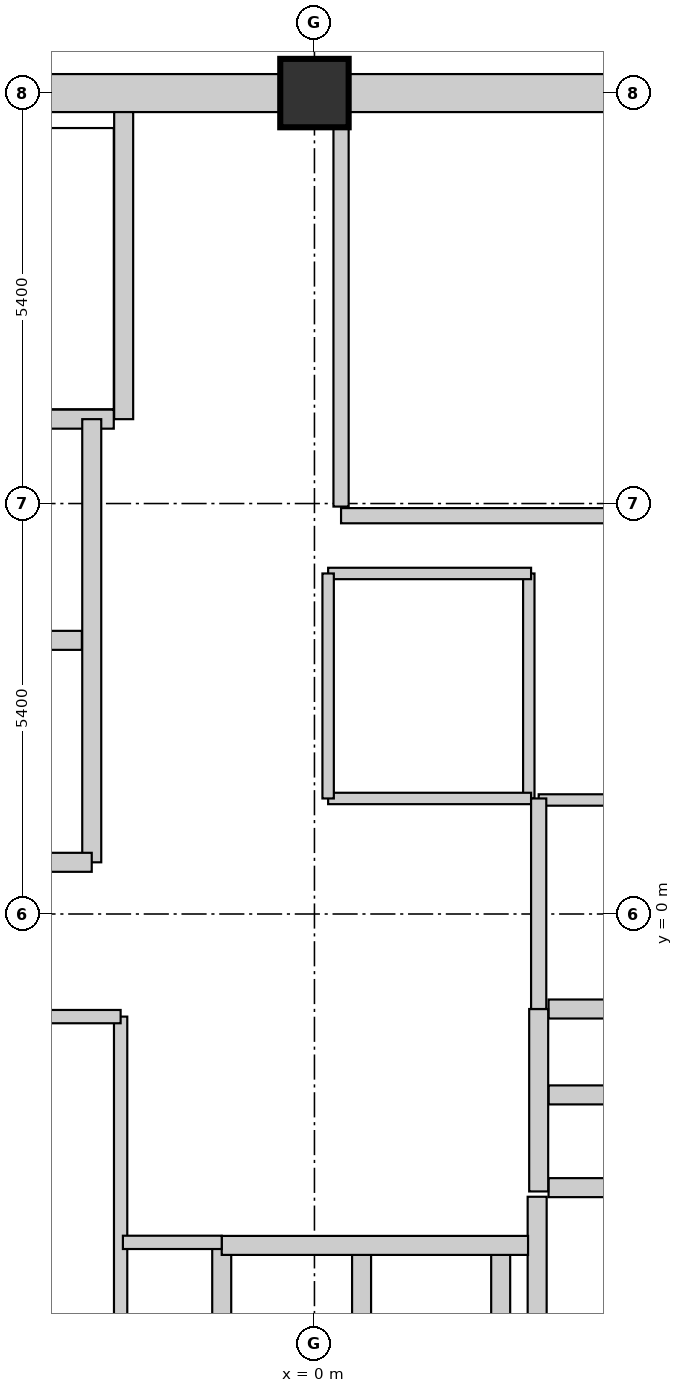
"""IFC4 building model, lengths in metres.
Left out: names, types, materials, properties, quantities, classifications, styles, units other than length and angle.
Written with IfcOpenShell. Run it as: python <this file> out.ifc"""

import sys

from ifc_helpers import new_model, si_unit, direction, frame, frame_2d, origin, origin_2d, place, context, subcontext, project, spatial, rectangle, extrude, element, fill, save


model = new_model("IFC4")
c1 = context("Model", 3, precision=1e-05, world=origin(), true_north=direction((0.0, 1.0)))
c2 = subcontext(c1, "Body", "Model", "MODEL_VIEW")
j1 = project(units=[si_unit("LENGTHUNIT", "METRE"), si_unit("PLANEANGLEUNIT", "RADIAN")], contexts=[c1])
p1 = place(None, origin())
s1 = spatial("IfcSite", under=j1, at=p1, CompositionType="ELEMENT")
p2 = place(p1, origin())
s2 = spatial("IfcBuilding", under=s1, at=p2, CompositionType="ELEMENT")
p3 = place(p2, frame((0.0, 0.0, 337.5)))
s3 = spatial("IfcBuildingStorey", under=s2, at=p3, CompositionType="ELEMENT", Elevation=337.5)
p4 = place(p3, frame((0.0, 10.8, 0.0), z_axis=(0.0, 0.0, 1.0), x_axis=(1.0, 0.0, 0.0)))
e1 = element("IfcColumn", 1, at=p4, inside=s3, PredefinedType="COLUMN", context=c2, shape_type="SweptSolid", body=[
    extrude(rectangle(XDim=0.9, YDim=0.9, at=origin_2d()), origin(), (0.0, 0.0, 1.0), 4.5),
])
p5 = place(p3, frame((-4.94, 10.8, 0.0), z_axis=(0.0, 0.0, 1.0), x_axis=(1.0, 0.0, 0.0)))
e2 = element("IfcWall", 2, at=p5, inside=s3, PredefinedType="SHEAR", context=c2, shape_type="SweptSolid", body=[
    extrude(rectangle(XDim=4.48, YDim=0.5, at=frame_2d((2.24, 0.0))), origin(), (0.0, 0.0, 1.0), 4.5),
])
p6 = place(p5, frame((3.13, 0.0, 0.0)))
e3 = element("IfcOpeningElement", 3, at=p6, cuts=e2, PredefinedType="OPENING", context=c2, shape_type="SweptSolid", body=[
    extrude(rectangle(XDim=1.1, YDim=2.1, at=frame_2d((0.55, 1.05))), frame((0.0, 0.26, 0.0), z_axis=(0.0, -1.0, 0.0), x_axis=(1.0, 0.0, 0.0)), (0.0, 0.0, 1.0), 0.52),
])
p7 = place(p3, frame((0.46, 10.8, 0.0), z_axis=(0.0, 0.0, 1.0), x_axis=(1.0, 0.0, 0.0)))
e4 = element("IfcWall", 4, at=p7, inside=s3, PredefinedType="SHEAR", context=c2, shape_type="SweptSolid", body=[
    extrude(rectangle(XDim=4.48, YDim=0.5, at=frame_2d((2.24, 0.0))), origin(), (0.0, 0.0, 1.0), 4.5),
])
p8 = place(p3, frame((2.93, -6.51, 0.0), z_axis=(0.0, 0.0, 1.0), x_axis=(0.0, 1.0, 0.0)))
e5 = element("IfcWall", 5, at=p8, inside=s3, PredefinedType="SHEAR", context=c2, shape_type="SweptSolid", body=[
    extrude(rectangle(XDim=2.79, YDim=0.25, at=frame_2d((1.395, 0.0))), origin(), (0.0, 0.0, 1.0), 4.5),
])
p9 = place(p3, frame((3.08, -3.6, 0.0), z_axis=(0.0, 0.0, 1.0), x_axis=(1.0, 0.0, 0.0)))
e6 = element("IfcWall", 6, at=p9, inside=s3, PredefinedType="SHEAR", context=c2, shape_type="SweptSolid", body=[
    extrude(rectangle(XDim=2.37, YDim=0.25, at=frame_2d((1.185, 0.0))), origin(), (0.0, 0.0, 1.0), 4.5),
])
for number, where, z_axis, x_axis in (
    (7, (0.62, -6.34, 0.0), (0.0, 0.0, 1.0), (0.0, 1.0, 0.0)),
    (8, (2.45, -6.34, 0.0), (0.0, 0.0, 1.0), (0.0, 1.0, 0.0)),
):
    element("IfcWall", number, at=place(p3, frame(where, z_axis=z_axis, x_axis=x_axis)), inside=s3, PredefinedType="SHEAR", context=c2, shape_type="SweptSolid", body=[
        extrude(rectangle(XDim=1.88, YDim=0.25, at=frame_2d((0.94, 0.0))), origin(), (0.0, 0.0, 1.0), 4.5),
    ])
p10 = place(p3, frame((-1.22, -6.44, 0.0), z_axis=(0.0, 0.0, 1.0), x_axis=(0.0, 1.0, 0.0)))
e9 = element("IfcWall", 9, at=p10, inside=s3, PredefinedType="SHEAR", context=c2, shape_type="SweptSolid", body=[
    extrude(rectangle(XDim=2.08, YDim=0.25, at=frame_2d((1.04, 0.0))), origin(), (0.0, 0.0, 1.0), 4.5),
])
p11 = place(p3, frame((-1.22, -4.36, 0.0), z_axis=(0.0, 0.0, 1.0), x_axis=(1.0, 0.0, 0.0)))
e10 = element("IfcWall", 10, at=p11, inside=s3, PredefinedType="SHEAR", context=c2, shape_type="SweptSolid", body=[
    extrude(rectangle(XDim=4.03, YDim=0.25, at=frame_2d((2.015, 0.0))), origin(), (0.0, 0.0, 1.0), 4.5),
])
for number, where, z_axis, x_axis in (
    (11, (3.08, -2.38, 0.0), (0.0, 0.0, 1.0), (1.0, 0.0, 0.0)),
    (12, (3.08, -1.25, 0.0), (0.0, 0.0, 1.0), (1.0, 0.0, 0.0)),
):
    element("IfcWall", number, at=place(p3, frame(where, z_axis=z_axis, x_axis=x_axis)), inside=s3, PredefinedType="SHEAR", context=c2, shape_type="SweptSolid", body=[
        extrude(rectangle(XDim=2.37, YDim=0.25, at=frame_2d((1.185, 0.0))), origin(), (0.0, 0.0, 1.0), 4.5),
    ])
p12 = place(p3, frame((2.95, -3.65, 0.0), z_axis=(0.0, 0.0, 1.0), x_axis=(0.0, 1.0, 0.0)))
e13 = element("IfcWall", 13, at=p12, inside=s3, PredefinedType="SHEAR", context=c2, shape_type="SweptSolid", body=[
    extrude(rectangle(XDim=2.4, YDim=0.25, at=frame_2d((1.2, 0.0))), origin(), (0.0, 0.0, 1.0), 4.5),
])
p13 = place(p12, frame((0.775, 0.0, 0.0)))
e14 = element("IfcOpeningElement", 14, at=p13, cuts=e13, PredefinedType="OPENING", context=c2, shape_type="SweptSolid", body=[
    extrude(rectangle(XDim=0.85, YDim=2.1, at=frame_2d((0.425, 1.05))), frame((0.0, 0.135, 0.0), z_axis=(0.0, -1.0, 0.0), x_axis=(1.0, 0.0, 0.0)), (0.0, 0.0, 1.0), 0.27),
])
p14 = place(p3, frame((-2.51, 6.51, 0.0), z_axis=(0.0, 0.0, 1.0), x_axis=(0.0, 1.0, 0.0)))
e15 = element("IfcWall", 15, at=p14, inside=s3, PredefinedType="SHEAR", context=c2, shape_type="SweptSolid", body=[
    extrude(rectangle(XDim=4.04, YDim=0.25, at=frame_2d((2.02, 0.0))), origin(), (0.0, 0.0, 1.0), 4.5),
])
p15 = place(p3, frame((-10.34, 6.51, 0.0), z_axis=(0.0, 0.0, 1.0), x_axis=(1.0, 0.0, 0.0)))
e16 = element("IfcWall", 16, at=p15, inside=s3, PredefinedType="SHEAR", context=c2, shape_type="SweptSolid", body=[
    extrude(rectangle(XDim=7.7, YDim=0.25, at=frame_2d((3.85, 0.0))), origin(), (0.0, 0.0, 1.0), 4.5),
])
p16 = place(p15, frame((0.35, 0.0, 0.0)))
e17 = element("IfcOpeningElement", 17, at=p16, cuts=e16, PredefinedType="OPENING", context=c2, shape_type="SweptSolid", body=[
    extrude(rectangle(XDim=1.1, YDim=2.1, at=frame_2d((0.55, 1.05))), frame((0.0, 0.135, 0.0), z_axis=(0.0, -1.0, 0.0), x_axis=(1.0, 0.0, 0.0)), (0.0, 0.0, 1.0), 0.27),
])
p17 = place(p3, frame((-2.93, 0.68, 0.0), z_axis=(0.0, 0.0, 1.0), x_axis=(0.0, 1.0, 0.0)))
e18 = element("IfcWall", 18, at=p17, inside=s3, PredefinedType="SHEAR", context=c2, shape_type="SweptSolid", body=[
    extrude(rectangle(XDim=5.83, YDim=0.25, at=frame_2d((2.915, 0.0))), origin(), (0.0, 0.0, 1.0), 4.5),
])
p18 = place(p17, frame((0.75, 0.0, 0.0)))
e19 = element("IfcOpeningElement", 19, at=p18, cuts=e18, PredefinedType="OPENING", context=c2, shape_type="SweptSolid", body=[
    extrude(rectangle(XDim=1.2, YDim=2.1, at=frame_2d((0.6, 1.05))), frame((0.0, 0.135, 0.0), z_axis=(0.0, -1.0, 0.0), x_axis=(1.0, 0.0, 0.0)), (0.0, 0.0, 1.0), 0.27),
])
p19 = place(p3, frame((-5.45, 3.6, 0.0), z_axis=(0.0, 0.0, 1.0), x_axis=(1.0, 0.0, 0.0)))
e20 = element("IfcWall", 20, at=p19, inside=s3, PredefinedType="SHEAR", context=c2, shape_type="SweptSolid", body=[
    extrude(rectangle(XDim=2.39, YDim=0.25, at=frame_2d((1.195, 0.0))), origin(), (0.0, 0.0, 1.0), 4.5),
])
p20 = place(p3, frame((-5.58, 0.68, 0.0), z_axis=(0.0, 0.0, 1.0), x_axis=(1.0, 0.0, 0.0)))
e21 = element("IfcWall", 21, at=p20, inside=s3, PredefinedType="SHEAR", context=c2, shape_type="SweptSolid", body=[
    extrude(rectangle(XDim=2.65, YDim=0.25, at=frame_2d((1.325, 0.0))), origin(), (0.0, 0.0, 1.0), 4.5),
])
p21 = place(p3, frame((2.82, 1.52, 0.0), z_axis=(0.0, 0.0, 1.0), x_axis=(0.0, 1.0, 0.0)))
e22 = element("IfcWall", 22, at=p21, inside=s3, PredefinedType="PARTITIONING", context=c2, shape_type="SweptSolid", body=[
    extrude(rectangle(XDim=2.96, YDim=0.15, at=frame_2d((1.48, 0.0))), origin(), (0.0, 0.0, 1.0), 4.22),
])
for number, where, z_axis, x_axis in (
    (23, (0.18, 4.48, 0.0), (0.0, 0.0, 1.0), (1.0, 0.0, 0.0)),
    (24, (0.18, 1.52, 0.0), (0.0, 0.0, 1.0), (1.0, 0.0, 0.0)),
):
    element("IfcWall", number, at=place(p3, frame(where, z_axis=z_axis, x_axis=x_axis)), inside=s3, PredefinedType="PARTITIONING", context=c2, shape_type="SweptSolid", body=[
        extrude(rectangle(XDim=2.67, YDim=0.15, at=frame_2d((1.335, 0.0))), origin(), (0.0, 0.0, 1.0), 4.22),
    ])
p22 = place(p3, frame((0.18, 1.52, 0.0), z_axis=(0.0, 0.0, 1.0), x_axis=(0.0, 1.0, 0.0)))
e25 = element("IfcWall", 25, at=p22, inside=s3, PredefinedType="PARTITIONING", context=c2, shape_type="SweptSolid", body=[
    extrude(rectangle(XDim=2.96, YDim=0.15, at=frame_2d((1.48, 0.0))), origin(), (0.0, 0.0, 1.0), 4.22),
])
p23 = place(p22, frame((0.95, 0.0, 0.0)))
e26 = element("IfcOpeningElement", 26, at=p23, cuts=e25, PredefinedType="OPENING", context=c2, shape_type="SweptSolid", body=[
    extrude(rectangle(XDim=0.85, YDim=2.1, at=frame_2d((0.425, 1.05))), frame((0.0, 0.085, 0.0), z_axis=(0.0, -1.0, 0.0), x_axis=(1.0, 0.0, 0.0)), (0.0, 0.0, 1.0), 0.17),
])
p24 = place(p3, frame((2.95, 1.5, 0.0), z_axis=(0.0, 0.0, 1.0), x_axis=(1.0, 0.0, 0.0)))
e27 = element("IfcWall", 27, at=p24, inside=s3, PredefinedType="PARTITIONING", context=c2, shape_type="SweptSolid", body=[
    extrude(rectangle(XDim=7.39, YDim=0.15, at=frame_2d((3.695, 0.0))), origin(), (0.0, 0.0, 1.0), 4.22),
])
p25 = place(p24, frame((2.2, 0.0, 0.0)))
e28 = element("IfcOpeningElement", 28, at=p25, cuts=e27, PredefinedType="OPENING", context=c2, shape_type="SweptSolid", body=[
    extrude(rectangle(XDim=0.95, YDim=2.1, at=frame_2d((0.475, 1.05))), frame((0.0, 0.085, 0.0), z_axis=(0.0, -1.0, 0.0), x_axis=(1.0, 0.0, 0.0)), (0.0, 0.0, 1.0), 0.17),
])
p26 = place(p3, frame((0.35, 5.24, 0.0), z_axis=(0.0, 0.0, 1.0), x_axis=(1.0, 0.0, 0.0)))
e29 = element("IfcWall", 29, at=p26, inside=s3, PredefinedType="PARTITIONING", context=c2, shape_type="SweptSolid", body=[
    extrude(rectangle(XDim=9.99, YDim=0.2, at=frame_2d((4.995, 0.0))), origin(), (0.0, 0.0, 1.0), 4.22),
])
p27 = place(p26, frame((0.8, 0.0, 0.0)))
e30 = element("IfcOpeningElement", 30, at=p27, cuts=e29, PredefinedType="OPENING", context=c2, shape_type="SweptSolid", body=[
    extrude(rectangle(XDim=1.1, YDim=2.1, at=frame_2d((0.55, 1.05))), frame((0.0, 0.11, 0.0), z_axis=(0.0, -1.0, 0.0), x_axis=(1.0, 0.0, 0.0)), (0.0, 0.0, 1.0), 0.22),
])
p28 = place(p3, frame((0.35, 5.36, 0.0), z_axis=(0.0, 0.0, 1.0), x_axis=(0.0, 1.0, 0.0)))
e31 = element("IfcWall", 31, at=p28, inside=s3, PredefinedType="PARTITIONING", context=c2, shape_type="SweptSolid", body=[
    extrude(rectangle(XDim=4.98, YDim=0.2, at=frame_2d((2.49, 0.0))), origin(), (0.0, 0.0, 1.0), 4.22),
])
p29 = place(p3, frame((-2.55, -6.51, 0.0), z_axis=(0.0, 0.0, 1.0), x_axis=(0.0, 1.0, 0.0)))
e32 = element("IfcWall", 32, at=p29, inside=s3, PredefinedType="PARTITIONING", context=c2, shape_type="SweptSolid", body=[
    extrude(rectangle(XDim=5.16, YDim=0.175, at=frame_2d((2.58, 0.0))), origin(), (0.0, 0.0, 1.0), 4.22),
])
p30 = place(p29, frame((0.95, 0.0, 0.0)))
e33 = element("IfcOpeningElement", 33, at=p30, cuts=e32, PredefinedType="OPENING", context=c2, shape_type="SweptSolid", body=[
    extrude(rectangle(XDim=0.85, YDim=2.1, at=frame_2d((0.425, 1.05))), frame((0.0, 0.097, 0.0), z_axis=(0.0, -1.0, 0.0), x_axis=(1.0, 0.0, 0.0)), (0.0, 0.0, 1.0), 0.195),
])
p31 = place(p3, frame((-7.18, -1.35, 0.0), z_axis=(0.0, 0.0, 1.0), x_axis=(1.0, 0.0, 0.0)))
e34 = element("IfcWall", 34, at=p31, inside=s3, PredefinedType="PARTITIONING", context=c2, shape_type="SweptSolid", body=[
    extrude(rectangle(XDim=4.63, YDim=0.175, at=frame_2d((2.315, 0.0))), origin(), (0.0, 0.0, 1.0), 4.22),
])
p32 = place(p3, frame((-2.52, -4.32, 0.0), z_axis=(0.0, 0.0, 1.0), x_axis=(1.0, 0.0, 0.0)))
e35 = element("IfcWall", 35, at=p32, inside=s3, PredefinedType="PARTITIONING", context=c2, shape_type="SweptSolid", body=[
    extrude(rectangle(XDim=1.3, YDim=0.175, at=frame_2d((0.65, 0.0))), origin(), (0.0, 0.0, 1.0), 4.22),
])
p33 = place(p32, frame((0.22, 0.0, 0.0)))
e36 = element("IfcOpeningElement", 36, at=p33, cuts=e35, PredefinedType="OPENING", context=c2, shape_type="SweptSolid", body=[
    extrude(rectangle(XDim=0.85, YDim=2.1, at=frame_2d((0.425, 1.05))), frame((0.0, 0.097, 0.0), z_axis=(0.0, -1.0, 0.0), x_axis=(1.0, 0.0, 0.0)), (0.0, 0.0, 1.0), 0.195),
])
p34 = place(p3, frame((2.95, -1.25, 0.0), z_axis=(0.0, 0.0, 1.0), x_axis=(0.0, 1.0, 0.0)))
e37 = element("IfcWall", 37, at=p34, inside=s3, PredefinedType="PARTITIONING", context=c2, shape_type="SweptSolid", body=[
    extrude(rectangle(XDim=2.77, YDim=0.2, at=frame_2d((1.385, 0.0))), origin(), (0.0, 0.0, 1.0), 4.22),
])
p35 = place(p34, frame((0.6, 0.0, 0.0)))
e38 = element("IfcOpeningElement", 38, at=p35, cuts=e37, PredefinedType="OPENING", context=c2, shape_type="SweptSolid", body=[
    extrude(rectangle(XDim=1.1, YDim=2.1, at=frame_2d((0.55, 1.05))), frame((0.0, 0.11, 0.0), z_axis=(0.0, -1.0, 0.0), x_axis=(1.0, 0.0, 0.0)), (0.0, 0.0, 1.0), 0.22),
])
p36 = place(p23, origin())
e39 = element("IfcDoor", 39, at=p36, inside=s3, OperationType="SINGLE_SWING_RIGHT", PredefinedType="DOOR", context=c2, shape_type="SweptSolid", body=[
    extrude(rectangle(XDim=0.85, YDim=2.1, at=frame_2d((0.425, 1.05))), frame((0.0, 0.025, 0.0), z_axis=(0.0, -1.0, 0.0), x_axis=(1.0, 0.0, 0.0)), (0.0, 0.0, 1.0), 0.05),
])
fill(e26, e39)
p37 = place(p13, origin())
e40 = element("IfcDoor", 40, at=p37, inside=s3, OperationType="SINGLE_SWING_LEFT", PredefinedType="DOOR", context=c2, shape_type="SweptSolid", body=[
    extrude(rectangle(XDim=0.85, YDim=2.1, at=frame_2d((0.425, 1.05))), frame((0.0, 0.025, 0.0), z_axis=(0.0, -1.0, 0.0), x_axis=(1.0, 0.0, 0.0)), (0.0, 0.0, 1.0), 0.05),
])
fill(e14, e40)
p38 = place(p6, origin())
e41 = element("IfcDoor", 41, at=p38, inside=s3, OperationType="SINGLE_SWING_LEFT", PredefinedType="DOOR", context=c2, shape_type="SweptSolid", body=[
    extrude(rectangle(XDim=1.1, YDim=2.1, at=frame_2d((0.55, 1.05))), frame((0.0, 0.025, 0.0), z_axis=(0.0, -1.0, 0.0), x_axis=(1.0, 0.0, 0.0)), (0.0, 0.0, 1.0), 0.05),
])
fill(e3, e41)
p39 = place(p18, origin())
e42 = element("IfcDoor", 42, at=p39, inside=s3, OperationType="SLIDING_TO_LEFT", PredefinedType="DOOR", context=c2, shape_type="SweptSolid", body=[
    extrude(rectangle(XDim=1.2, YDim=2.1, at=frame_2d((0.6, 1.05))), frame((0.0, 0.025, 0.0), z_axis=(0.0, -1.0, 0.0), x_axis=(1.0, 0.0, 0.0)), (0.0, 0.0, 1.0), 0.05),
])
fill(e19, e42)
p40 = place(p27, origin())
e43 = element("IfcDoor", 43, at=p40, inside=s3, OperationType="SINGLE_SWING_LEFT", PredefinedType="DOOR", context=c2, shape_type="SweptSolid", body=[
    extrude(rectangle(XDim=1.1, YDim=2.1, at=frame_2d((0.55, 1.05))), frame((0.0, 0.025, 0.0), z_axis=(0.0, -1.0, 0.0), x_axis=(1.0, 0.0, 0.0)), (0.0, 0.0, 1.0), 0.05),
])
fill(e30, e43)
p41 = place(p35, origin())
e44 = element("IfcDoor", 44, at=p41, inside=s3, OperationType="SINGLE_SWING_LEFT", PredefinedType="DOOR", context=c2, shape_type="SweptSolid", body=[
    extrude(rectangle(XDim=1.1, YDim=2.1, at=frame_2d((0.55, 1.05))), frame((0.0, 0.025, 0.0), z_axis=(0.0, -1.0, 0.0), x_axis=(1.0, 0.0, 0.0)), (0.0, 0.0, 1.0), 0.05),
])
fill(e38, e44)
p42 = place(p33, origin())
e45 = element("IfcDoor", 45, at=p42, inside=s3, OperationType="SINGLE_SWING_LEFT", PredefinedType="DOOR", context=c2, shape_type="SweptSolid", body=[
    extrude(rectangle(XDim=0.85, YDim=2.1, at=frame_2d((0.425, 1.05))), frame((0.0, 0.025, 0.0), z_axis=(0.0, -1.0, 0.0), x_axis=(1.0, 0.0, 0.0)), (0.0, 0.0, 1.0), 0.05),
])
fill(e36, e45)
p43 = place(p30, origin())
e46 = element("IfcDoor", 46, at=p43, inside=s3, OperationType="SINGLE_SWING_LEFT", PredefinedType="DOOR", context=c2, shape_type="SweptSolid", body=[
    extrude(rectangle(XDim=0.85, YDim=2.1, at=frame_2d((0.425, 1.05))), frame((0.0, 0.025, 0.0), z_axis=(0.0, -1.0, 0.0), x_axis=(1.0, 0.0, 0.0)), (0.0, 0.0, 1.0), 0.05),
])
fill(e33, e46)
save(model, sys.argv[1])
